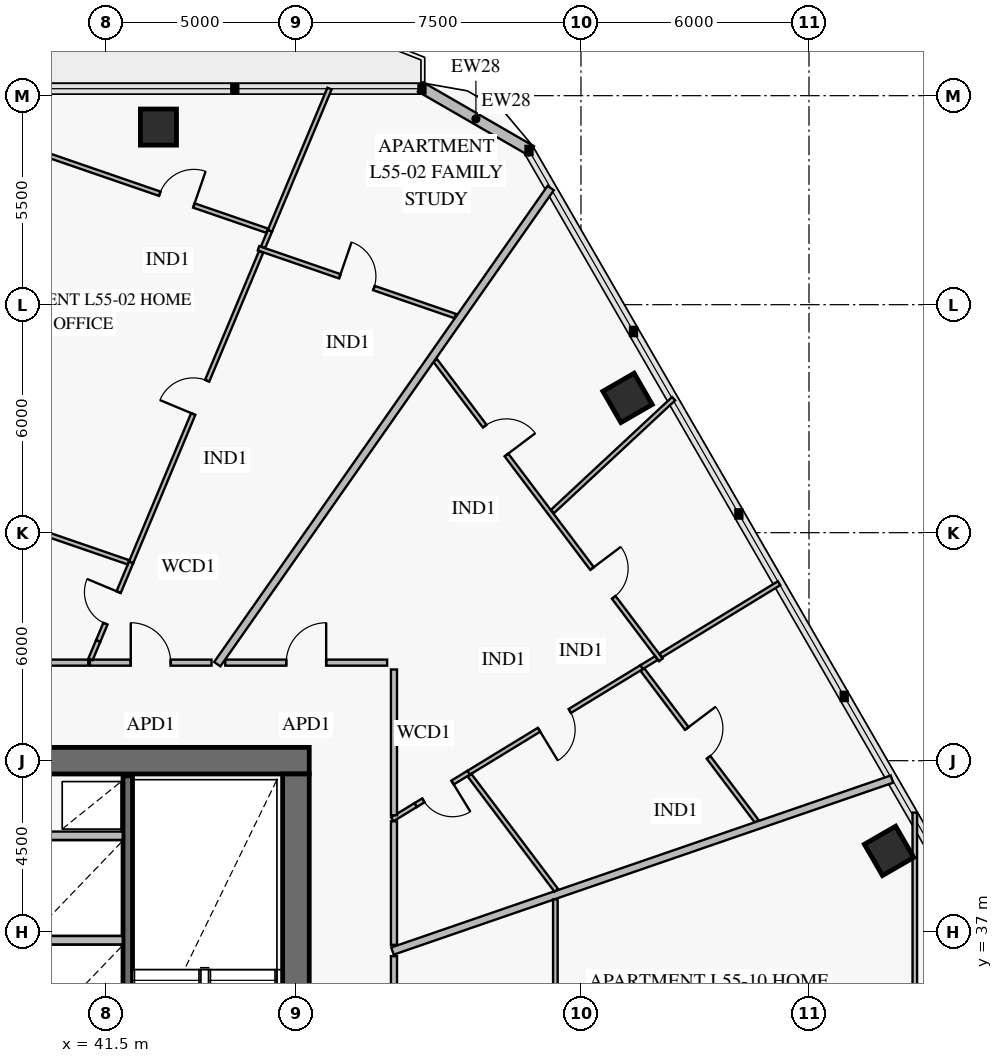
"""IFC4 building model, lengths in metres.
Left out: names, types, materials, properties, quantities, classifications, styles, units other than length and angle.
Written with IfcOpenShell. Run it as: python <this file> out.ifc"""

import sys

from ifc_helpers import new_model, si_unit, direction, frame, frame_2d, origin, origin_2d, place, context, subcontext, project, spatial, rectangle, extrude, element, fill, save


model = new_model("IFC4")
c1 = context("Model", 3, precision=1e-05, world=origin(), true_north=direction((0.0, 1.0)))
c2 = subcontext(c1, "Body", "Model", "MODEL_VIEW")
j1 = project(units=[si_unit("LENGTHUNIT", "METRE"), si_unit("PLANEANGLEUNIT", "RADIAN")], contexts=[c1])
p1 = place(None, origin())
s1 = spatial("IfcSite", under=j1, at=p1, CompositionType="ELEMENT")
p2 = place(p1, origin())
s2 = spatial("IfcBuilding", under=s1, at=p2, CompositionType="ELEMENT")
p3 = place(p2, frame((0.0, 0.0, 218.8)))
s3 = spatial("IfcBuildingStorey", under=s2, at=p3, CompositionType="ELEMENT", Elevation=218.8)
p4 = place(p3, frame((46.85, 41.5, 0.0), z_axis=(0.0, 0.0, 1.0), x_axis=(-1.0, 0.0, 0.0)))
e1 = element("IfcWall", 1, at=p4, inside=s3, PredefinedType="SHEAR", context=c2, shape_type="SweptSolid", body=[
    extrude(rectangle(XDim=7.9, YDim=0.7, at=frame_2d((3.95, 0.0))), origin(), (0.0, 0.0, 1.0), 3.8),
])
p5 = place(p3, frame((46.5, 22.85, 0.0), z_axis=(0.0, 0.0, 1.0), x_axis=(0.0, 1.0, 0.0)))
e2 = element("IfcWall", 2, at=p5, inside=s3, PredefinedType="SHEAR", context=c2, shape_type="SweptSolid", body=[
    extrude(rectangle(XDim=18.3, YDim=0.7, at=frame_2d((9.15, 0.0))), origin(), (0.0, 0.0, 1.0), 3.8),
])
p6 = place(p5, frame((8.9, 0.0, 0.0)))
e3 = element("IfcOpeningElement", 3, at=p6, cuts=e2, PredefinedType="OPENING", context=c2, shape_type="SweptSolid", body=[
    extrude(rectangle(XDim=1.1, YDim=2.15, at=frame_2d((0.55, 1.075))), frame((0.0, 0.362, 0.0), z_axis=(0.0, -1.0, 0.0), x_axis=(1.0, 0.0, 0.0)), (0.0, 0.0, 1.0), 0.724),
])
for number, where, z_axis, x_axis in (
    (4, (62.108, 39.126, 0.0), (0.0, 0.0, 1.0), (-0.5, 0.866, 0.0)),
    (5, (55.226, 51.047, 0.0), (0.0, 0.0, 1.0), (-0.5, 0.866, 0.0)),
    (6, (42.882, 58.173, 0.0), (0.0, 0.0, 1.0), (-1.0, 0.0, 0.0)),
):
    element("IfcColumn", number, at=place(p3, frame(where, z_axis=z_axis, x_axis=x_axis)), inside=s3, PredefinedType="COLUMN", context=c2, shape_type="SweptSolid", body=[
        extrude(rectangle(XDim=0.95, YDim=0.95, at=origin_2d()), origin(), (0.0, 0.0, 1.0), 3.55),
    ])
p7 = place(p3, frame((49.779, 59.231, 0.0), z_axis=(0.0, 0.0, 1.0), x_axis=(0.866020068361, -0.500009241111, 0.0)))
e7 = element("IfcWall", 7, at=p7, inside=s3, PredefinedType="SOLIDWALL", context=c2, shape_type="SweptSolid", body=[
    extrude(rectangle(XDim=3.365, YDim=0.28, at=frame_2d((1.683, 0.0))), origin(), (0.0, 0.0, 1.0), 3.55),
])
p8 = place(p3, frame((42.075, 31.4, 0.0), z_axis=(0.0, 0.0, 1.0), x_axis=(0.0, 1.0, 0.0)))
e8 = element("IfcWall", 8, at=p8, inside=s3, PredefinedType="SOLIDWALL", context=c2, shape_type="SweptSolid", body=[
    extrude(rectangle(XDim=9.7, YDim=0.25, at=frame_2d((4.85, 0.0))), origin(), (0.0, 0.0, 1.0), 3.8),
])
p9 = place(p3, frame((56.102, 44.153, 0.0), z_axis=(0.0, 0.0, 1.0), x_axis=(-0.601823931742, 0.798628796865, 0.0)))
e9 = element("IfcWall", 9, at=p9, inside=s3, PredefinedType="PARTITIONING", context=c2, shape_type="SweptSolid", body=[
    extrude(rectangle(XDim=9.865, YDim=0.12, at=frame_2d((4.932, 0.0))), origin(), (0.0, 0.0, 1.0), 2.9),
])
p10 = place(p9, frame((2.059, 0.0, 0.0)))
e10 = element("IfcOpeningElement", 10, at=p10, cuts=e9, PredefinedType="OPENING", context=c2, shape_type="SweptSolid", body=[
    extrude(rectangle(XDim=0.95, YDim=2.1, at=frame_2d((0.475, 1.05))), frame((0.0, 0.072, 0.0), z_axis=(0.0, -1.0, 0.0), x_axis=(1.0, 0.0, 0.0)), (0.0, 0.0, 1.0), 0.144),
])
p11 = place(p9, frame((6.751, 0.0, 0.0)))
e11 = element("IfcOpeningElement", 11, at=p11, cuts=e9, PredefinedType="OPENING", context=c2, shape_type="SweptSolid", body=[
    extrude(rectangle(XDim=0.95, YDim=2.1, at=frame_2d((0.475, 1.05))), frame((0.0, 0.072, 0.0), z_axis=(0.0, -1.0, 0.0), x_axis=(1.0, 0.0, 0.0)), (0.0, 0.0, 1.0), 0.144),
])
p12 = place(p3, frame((49.65, 40.332, 0.0), z_axis=(0.0, 0.0, 1.0), x_axis=(0.853576385117, 0.520967709911, 0.0)))
e12 = element("IfcWall", 12, at=p12, inside=s3, PredefinedType="PARTITIONING", context=c2, shape_type="SweptSolid", body=[
    extrude(rectangle(XDim=1.638, YDim=0.12, at=frame_2d((0.819, 0.0))), origin(), (0.0, 0.0, 1.0), 3.55),
])
p13 = place(p12, frame((0.238, 0.0, 0.0)))
e13 = element("IfcOpeningElement", 13, at=p13, cuts=e12, PredefinedType="OPENING", context=c2, shape_type="SweptSolid", body=[
    extrude(rectangle(XDim=0.9, YDim=2.1, at=frame_2d((0.45, 1.05))), frame((0.0, 0.072, 0.0), z_axis=(0.0, -1.0, 0.0), x_axis=(1.0, 0.0, 0.0)), (0.0, 0.0, 1.0), 0.144),
])
p14 = place(p3, frame((51.048, 41.186, 0.0), z_axis=(0.0, 0.0, 1.0), x_axis=(0.853552291935, 0.521007183187, 0.0)))
e14 = element("IfcWall", 14, at=p14, inside=s3, PredefinedType="PARTITIONING", context=c2, shape_type="SweptSolid", body=[
    extrude(rectangle(XDim=5.331, YDim=0.12, at=frame_2d((2.666, 0.0))), origin(), (0.0, 0.0, 1.0), 3.15),
])
p15 = place(p14, frame((2.165, 0.0, 0.0)))
e15 = element("IfcOpeningElement", 15, at=p15, cuts=e14, PredefinedType="OPENING", context=c2, shape_type="SweptSolid", body=[
    extrude(rectangle(XDim=0.95, YDim=2.1, at=frame_2d((0.475, 1.05))), frame((0.0, 0.072, 0.0), z_axis=(0.0, -1.0, 0.0), x_axis=(1.0, 0.0, 0.0)), (0.0, 0.0, 1.0), 0.144),
])
p16 = place(p3, frame((58.625, 39.906, 0.0), z_axis=(0.0, 0.0, 1.0), x_axis=(-0.60182042423, 0.798631440015, 0.0)))
e16 = element("IfcWall", 16, at=p16, inside=s3, PredefinedType="PARTITIONING", context=c2, shape_type="SweptSolid", body=[
    extrude(rectangle(XDim=4.995, YDim=0.12, at=frame_2d((2.498, 0.0))), origin(), (0.0, 0.0, 1.0), 3.55),
])
p17 = place(p16, frame((2.107, 0.0, 0.0)))
e17 = element("IfcOpeningElement", 17, at=p17, cuts=e16, PredefinedType="OPENING", context=c2, shape_type="SweptSolid", body=[
    extrude(rectangle(XDim=0.95, YDim=2.1, at=frame_2d((0.475, 1.05))), frame((0.0, 0.072, 0.0), z_axis=(0.0, -1.0, 0.0), x_axis=(1.0, 0.0, 0.0)), (0.0, 0.0, 1.0), 0.144),
])
p18 = place(p3, frame((48.9, 44.08, 0.0), z_axis=(0.0, 0.0, 1.0), x_axis=(-1.0, 0.0, 0.0)))
e18 = element("IfcWall", 18, at=p18, inside=s3, PredefinedType="PARTITIONING", context=c2, shape_type="SweptSolid", body=[
    extrude(rectangle(XDim=4.259, YDim=0.16, at=frame_2d((2.129, 0.0))), origin(), (0.0, 0.0, 1.0), 2.9),
])
p19 = place(p18, frame((1.604, 0.0, 0.0)))
e19 = element("IfcOpeningElement", 19, at=p19, cuts=e18, PredefinedType="OPENING", context=c2, shape_type="SweptSolid", body=[
    extrude(rectangle(XDim=1.05, YDim=2.15, at=frame_2d((0.525, 1.075))), frame((0.0, 0.092, 0.0), z_axis=(0.0, -1.0, 0.0), x_axis=(1.0, 0.0, 0.0)), (0.0, 0.0, 1.0), 0.184),
])
p20 = place(p3, frame((50.692, 53.201, 0.0), z_axis=(0.0, 0.0, 1.0), x_axis=(-0.945511260009, 0.325589399698, 0.0)))
e20 = element("IfcWall", 20, at=p20, inside=s3, PredefinedType="PARTITIONING", context=c2, shape_type="SweptSolid", body=[
    extrude(rectangle(XDim=5.475, YDim=0.12, at=frame_2d((2.738, 0.0))), origin(), (0.0, 0.0, 1.0), 3.55),
])
p21 = place(p20, frame((2.263, 0.0, 0.0)))
e21 = element("IfcOpeningElement", 21, at=p21, cuts=e20, PredefinedType="OPENING", context=c2, shape_type="SweptSolid", body=[
    extrude(rectangle(XDim=0.95, YDim=2.1, at=frame_2d((0.475, 1.05))), frame((0.0, 0.072, 0.0), z_axis=(0.0, -1.0, 0.0), x_axis=(1.0, 0.0, 0.0)), (0.0, 0.0, 1.0), 0.144),
])
p22 = place(p3, frame((41.297, 44.65, 0.0), z_axis=(0.0, 0.0, 1.0), x_axis=(0.386243492927, 0.922396858284, 0.0)))
e22 = element("IfcWall", 22, at=p22, inside=s3, PredefinedType="PARTITIONING", context=c2, shape_type="SweptSolid", body=[
    extrude(rectangle(XDim=2.246, YDim=0.12, at=frame_2d((1.123, 0.0))), origin(), (0.0, 0.0, 1.0), 3.55),
])
p23 = place(p22, frame((0.493, 0.0, 0.0)))
e23 = element("IfcOpeningElement", 23, at=p23, cuts=e22, PredefinedType="OPENING", context=c2, shape_type="SweptSolid", body=[
    extrude(rectangle(XDim=0.9, YDim=2.1, at=frame_2d((0.45, 1.05))), frame((0.0, 0.072, 0.0), z_axis=(0.0, -1.0, 0.0), x_axis=(1.0, 0.0, 0.0)), (0.0, 0.0, 1.0), 0.144),
])
p24 = place(p3, frame((42.164, 46.721, 0.0), z_axis=(0.0, 0.0, 1.0), x_axis=(0.386200840547, 0.922414717337, 0.0)))
e24 = element("IfcWall", 24, at=p24, inside=s3, PredefinedType="PARTITIONING", context=c2, shape_type="SweptSolid", body=[
    extrude(rectangle(XDim=8.854, YDim=0.12, at=frame_2d((4.427, 0.0))), origin(), (0.0, 0.0, 1.0), 3.55),
])
p25 = place(p24, frame((4.229, 0.0, 0.0)))
e25 = element("IfcOpeningElement", 25, at=p25, cuts=e24, PredefinedType="OPENING", context=c2, shape_type="SweptSolid", body=[
    extrude(rectangle(XDim=0.95, YDim=2.1, at=frame_2d((0.475, 1.05))), frame((0.0, 0.072, 0.0), z_axis=(0.0, -1.0, 0.0), x_axis=(1.0, 0.0, 0.0)), (0.0, 0.0, 1.0), 0.144),
])
p26 = place(p3, frame((45.636, 55.014, 0.0), z_axis=(0.0, 0.0, 1.0), x_axis=(0.38631298857, 0.922367754674, 0.0)))
e26 = element("IfcWall", 26, at=p26, inside=s3, PredefinedType="PARTITIONING", context=c2, shape_type="SweptSolid", body=[
    extrude(rectangle(XDim=0.469, YDim=0.12, at=frame_2d((0.235, 0.0))), origin(), (0.0, 0.0, 1.0), 3.55),
])
p27 = place(p3, frame((45.743, 55.446, 0.0), z_axis=(0.0, 0.0, 1.0), x_axis=(-0.945509015954, 0.325595916358, 0.0)))
e27 = element("IfcWall", 27, at=p27, inside=s3, PredefinedType="PARTITIONING", context=c2, shape_type="SweptSolid", body=[
    extrude(rectangle(XDim=8.711, YDim=0.12, at=frame_2d((4.355, 0.0))), origin(), (0.0, 0.0, 1.0), 2.87),
])
p28 = place(p27, frame((2.04, 0.0, 0.0)))
e28 = element("IfcOpeningElement", 28, at=p28, cuts=e27, PredefinedType="OPENING", context=c2, shape_type="SweptSolid", body=[
    extrude(rectangle(XDim=0.95, YDim=2.1, at=frame_2d((0.475, 1.05))), frame((0.0, 0.072, 0.0), z_axis=(0.0, -1.0, 0.0), x_axis=(1.0, 0.0, 0.0)), (0.0, 0.0, 1.0), 0.144),
])
p29 = place(p3, frame((44.278, 44.08, 0.0), z_axis=(0.0, 0.0, 1.0), x_axis=(-1.0, 0.0, 0.0)))
e29 = element("IfcWall", 29, at=p29, inside=s3, PredefinedType="PARTITIONING", context=c2, shape_type="SweptSolid", body=[
    extrude(rectangle(XDim=3.198, YDim=0.16, at=frame_2d((1.599, 0.0))), origin(), (0.0, 0.0, 1.0), 3.55),
])
p30 = place(p29, frame((1.074, 0.0, 0.0)))
e30 = element("IfcOpeningElement", 30, at=p30, cuts=e29, PredefinedType="OPENING", context=c2, shape_type="SweptSolid", body=[
    extrude(rectangle(XDim=1.05, YDim=2.15, at=frame_2d((0.525, 1.075))), frame((0.0, 0.092, 0.0), z_axis=(0.0, -1.0, 0.0), x_axis=(1.0, 0.0, 0.0)), (0.0, 0.0, 1.0), 0.184),
])
p31 = place(p3, frame((62.784, 29.988, 0.0), z_axis=(0.0, 0.0, 1.0), x_axis=(0.0, 1.0, 0.0)))
e31 = element("IfcWall", 31, at=p31, inside=s3, PredefinedType="PARTITIONING", context=c2, shape_type="SweptSolid", body=[
    extrude(rectangle(XDim=10.146, YDim=0.12, at=frame_2d((5.073, 0.0))), origin(), (0.0, 0.0, 1.0), 3.122),
])
p32 = place(p31, frame((4.514, 0.0, 0.0)))
e32 = element("IfcOpeningElement", 32, at=p32, cuts=e31, PredefinedType="OPENING", context=c2, shape_type="SweptSolid", body=[
    extrude(rectangle(XDim=0.95, YDim=2.1, at=frame_2d((0.475, 1.05))), frame((0.0, 0.072, 0.0), z_axis=(0.0, -1.0, 0.0), x_axis=(1.0, 0.0, 0.0)), (0.0, 0.0, 1.0), 0.144),
])
for number, where, z_axis, x_axis in (
    (33, (39.558, 36.775, 0.0), (0.0, 0.0, 1.0), (1.0, 0.0, 0.0)),
    (34, (39.558, 39.525, 0.0), (0.0, 0.0, 1.0), (1.0, 0.0, 0.0)),
):
    element("IfcWall", number, at=place(p3, frame(where, z_axis=z_axis, x_axis=x_axis)), inside=s3, PredefinedType="PARTITIONING", context=c2, shape_type="SweptSolid", body=[
        extrude(rectangle(XDim=2.384, YDim=0.22, at=frame_2d((1.192, 0.0))), origin(), (0.0, 0.0, 1.0), 3.55),
    ])
p33 = place(p3, frame((49.04, 36.49, 0.0), z_axis=(0.0, 0.0, 1.0), x_axis=(0.94551604925, 0.325575491417, 0.0)))
e35 = element("IfcWall", 35, at=p33, inside=s3, PredefinedType="PARTITIONING", context=c2, shape_type="SweptSolid", body=[
    extrude(rectangle(XDim=13.9, YDim=0.2, at=frame_2d((6.95, 0.0))), origin(), (0.0, 0.0, 1.0), 2.87),
])
p34 = place(p3, frame((53.247, 48.055, 0.0), z_axis=(0.0, 0.0, 1.0), x_axis=(0.731935379079, 0.681374053551, 0.0)))
e36 = element("IfcWall", 36, at=p34, inside=s3, PredefinedType="PARTITIONING", context=c2, shape_type="SweptSolid", body=[
    extrude(rectangle(XDim=4.36, YDim=0.12, at=frame_2d((2.18, 0.0))), origin(), (0.0, 0.0, 1.0), 2.87),
])
p35 = place(p3, frame((49.035, 39.957, 0.0), z_axis=(0.0, 0.0, 1.0), x_axis=(0.853491148884, 0.521107339017, 0.0)))
e37 = element("IfcWall", 37, at=p35, inside=s3, PredefinedType="PARTITIONING", context=c2, shape_type="SweptSolid", body=[
    extrude(rectangle(XDim=0.72, YDim=0.12, at=frame_2d((0.36, 0.0))), origin(), (0.0, 0.0, 1.0), 3.55),
])
p36 = place(p3, frame((55.598, 43.963, 0.0), z_axis=(0.0, 0.0, 1.0), x_axis=(0.8534556965, 0.521165399956, 0.0)))
e38 = element("IfcWall", 38, at=p36, inside=s3, PredefinedType="PARTITIONING", context=c2, shape_type="SweptSolid", body=[
    extrude(rectangle(XDim=0.451, YDim=0.12, at=frame_2d((0.226, 0.0))), origin(), (0.0, 0.0, 1.0), 3.55),
])
p37 = place(p3, frame((56.1, 44.269, 0.0), z_axis=(0.0, 0.0, 1.0), x_axis=(0.853564621018, 0.520986984239, 0.0)))
e39 = element("IfcWall", 39, at=p37, inside=s3, PredefinedType="PARTITIONING", context=c2, shape_type="SweptSolid", body=[
    extrude(rectangle(XDim=3.648, YDim=0.12, at=frame_2d((1.824, 0.0))), origin(), (0.0, 0.0, 1.0), 2.87),
])
p38 = place(p3, frame((53.351, 38.089, 0.0), z_axis=(0.0, 0.0, 1.0), x_axis=(-0.601810973107, 0.798638561959, 0.0)))
e40 = element("IfcWall", 40, at=p38, inside=s3, PredefinedType="PARTITIONING", context=c2, shape_type="SweptSolid", body=[
    extrude(rectangle(XDim=3.793, YDim=0.12, at=frame_2d((1.896, 0.0))), origin(), (0.0, 0.0, 1.0), 3.55),
])
p39 = place(p3, frame((44.43, 44.04, 0.0), z_axis=(0.0, 0.0, 1.0), x_axis=(0.573576964884, 0.819151674206, 0.0)))
e41 = element("IfcWall", 41, at=p39, inside=s3, PredefinedType="PARTITIONING", context=c2, shape_type="SweptSolid", body=[
    extrude(rectangle(XDim=15.295, YDim=0.2, at=frame_2d((7.647, 0.0))), origin(), (0.0, 0.0, 1.0), 2.87),
])
p40 = place(p3, frame((41.095, 44.168, 0.0), z_axis=(0.0, 0.0, 1.0), x_axis=(0.38640620175, 0.922328708893, 0.0)))
e42 = element("IfcWall", 42, at=p40, inside=s3, PredefinedType="PARTITIONING", context=c2, shape_type="SweptSolid", body=[
    extrude(rectangle(XDim=0.522, YDim=0.12, at=frame_2d((0.261, 0.0))), origin(), (0.0, 0.0, 1.0), 3.55),
])
p41 = place(p3, frame((45.818, 55.447, 0.0), z_axis=(0.0, 0.0, 1.0), x_axis=(0.386222700776, 0.922405564492, 0.0)))
e43 = element("IfcWall", 43, at=p41, inside=s3, PredefinedType="PARTITIONING", context=c2, shape_type="SweptSolid", body=[
    extrude(rectangle(XDim=4.054, YDim=0.12, at=frame_2d((2.027, 0.0))), origin(), (0.0, 0.0, 1.0), 2.87),
])
p42 = place(p3, frame((42.09, 46.721, 0.0), z_axis=(0.0, 0.0, 1.0), x_axis=(-0.945518250286, 0.325569099234, 0.0)))
e44 = element("IfcWall", 44, at=p42, inside=s3, PredefinedType="PARTITIONING", context=c2, shape_type="SweptSolid", body=[
    extrude(rectangle(XDim=5.479, YDim=0.12, at=frame_2d((2.74, 0.0))), origin(), (0.0, 0.0, 1.0), 2.9),
])
p43 = place(p3, frame((53.327, 30.723, 0.0), z_axis=(0.0, 0.0, 1.0), x_axis=(0.0, 1.0, 0.0)))
e45 = element("IfcWall", 45, at=p43, inside=s3, PredefinedType="PARTITIONING", context=c2, shape_type="SweptSolid", body=[
    extrude(rectangle(XDim=7.129, YDim=0.12, at=frame_2d((3.564, 0.0))), origin(), (0.0, 0.0, 1.0), 2.9),
])
p44 = place(p3, frame((49.08, 40.064, 0.0), z_axis=(0.0, 0.0, 1.0), x_axis=(0.0, 1.0, 0.0)))
e46 = element("IfcWall", 46, at=p44, inside=s3, PredefinedType="PARTITIONING", context=c2, shape_type="SweptSolid", body=[
    extrude(rectangle(XDim=3.836, YDim=0.16, at=frame_2d((1.918, 0.0))), origin(), (0.0, 0.0, 1.0), 3.55),
])
p45 = place(p3, frame((49.08, 36.653, 0.0), z_axis=(0.0, 0.0, 1.0), x_axis=(0.0, 1.0, 0.0)))
e47 = element("IfcWall", 47, at=p45, inside=s3, PredefinedType="PARTITIONING", context=c2, shape_type="SweptSolid", body=[
    extrude(rectangle(XDim=3.251, YDim=0.16, at=frame_2d((1.625, 0.0))), origin(), (0.0, 0.0, 1.0), 3.55),
])
p46 = place(p3, frame((41.036, 44.08, 0.0), z_axis=(0.0, 0.0, 1.0), x_axis=(-1.0, 0.0, 0.0)))
e48 = element("IfcWall", 48, at=p46, inside=s3, PredefinedType="PARTITIONING", context=c2, shape_type="SweptSolid", body=[
    extrude(rectangle(XDim=4.278, YDim=0.16, at=frame_2d((2.139, 0.0))), origin(), (0.0, 0.0, 1.0), 2.9),
])
p47 = place(p3, frame((49.08, 31.052, 0.0), z_axis=(0.0, 0.0, 1.0), x_axis=(0.0, 1.0, 0.0)))
e49 = element("IfcWall", 49, at=p47, inside=s3, PredefinedType="PARTITIONING", context=c2, shape_type="SweptSolid", body=[
    extrude(rectangle(XDim=5.303, YDim=0.16, at=frame_2d((2.651, 0.0))), origin(), (0.0, 0.0, 1.0), 2.9),
])
p48 = place(p10, frame((0.95, 0.0, 0.0), z_axis=(0.0, 0.0, 1.0), x_axis=(-1.0, 0.0, 0.0)))
e50 = element("IfcDoor", 50, at=p48, inside=s3, OperationType="SINGLE_SWING_LEFT", PredefinedType="DOOR", context=c2, shape_type="SweptSolid", body=[
    extrude(rectangle(XDim=0.95, YDim=2.1, at=frame_2d((0.475, 1.05))), frame((0.0, 0.025, 0.0), z_axis=(0.0, -1.0, 0.0), x_axis=(1.0, 0.0, 0.0)), (0.0, 0.0, 1.0), 0.05),
])
fill(e10, e50)
p49 = place(p11, frame((0.95, 0.0, 0.0), z_axis=(0.0, 0.0, 1.0), x_axis=(-1.0, 0.0, 0.0)))
e51 = element("IfcDoor", 51, at=p49, inside=s3, OperationType="SINGLE_SWING_RIGHT", PredefinedType="DOOR", context=c2, shape_type="SweptSolid", body=[
    extrude(rectangle(XDim=0.95, YDim=2.1, at=frame_2d((0.475, 1.05))), frame((0.0, 0.025, 0.0), z_axis=(0.0, -1.0, 0.0), x_axis=(1.0, 0.0, 0.0)), (0.0, 0.0, 1.0), 0.05),
])
fill(e11, e51)
p50 = place(p13, frame((0.9, 0.0, 0.0), z_axis=(0.0, 0.0, 1.0), x_axis=(-1.0, 0.0, 0.0)))
e52 = element("IfcDoor", 52, at=p50, inside=s3, OperationType="SINGLE_SWING_LEFT", PredefinedType="DOOR", context=c2, shape_type="SweptSolid", body=[
    extrude(rectangle(XDim=0.9, YDim=2.1, at=frame_2d((0.45, 1.05))), frame((0.0, 0.025, 0.0), z_axis=(0.0, -1.0, 0.0), x_axis=(1.0, 0.0, 0.0)), (0.0, 0.0, 1.0), 0.05),
])
fill(e13, e52)
p51 = place(p15, frame((0.95, 0.0, 0.0), z_axis=(0.0, 0.0, 1.0), x_axis=(-1.0, 0.0, 0.0)))
e53 = element("IfcDoor", 53, at=p51, inside=s3, OperationType="SINGLE_SWING_RIGHT", PredefinedType="DOOR", context=c2, shape_type="SweptSolid", body=[
    extrude(rectangle(XDim=0.95, YDim=2.1, at=frame_2d((0.475, 1.05))), frame((0.0, 0.025, 0.0), z_axis=(0.0, -1.0, 0.0), x_axis=(1.0, 0.0, 0.0)), (0.0, 0.0, 1.0), 0.05),
])
fill(e15, e53)
p52 = place(p17, frame((0.95, 0.0, 0.0), z_axis=(0.0, 0.0, 1.0), x_axis=(-1.0, 0.0, 0.0)))
e54 = element("IfcDoor", 54, at=p52, inside=s3, OperationType="SINGLE_SWING_LEFT", PredefinedType="DOOR", context=c2, shape_type="SweptSolid", body=[
    extrude(rectangle(XDim=0.95, YDim=2.1, at=frame_2d((0.475, 1.05))), frame((0.0, 0.025, 0.0), z_axis=(0.0, -1.0, 0.0), x_axis=(1.0, 0.0, 0.0)), (0.0, 0.0, 1.0), 0.05),
])
fill(e17, e54)
p53 = place(p19, frame((1.05, 0.0, 0.0), z_axis=(0.0, 0.0, 1.0), x_axis=(-1.0, 0.0, 0.0)))
e55 = element("IfcDoor", 55, at=p53, inside=s3, OperationType="SINGLE_SWING_RIGHT", PredefinedType="DOOR", context=c2, shape_type="SweptSolid", body=[
    extrude(rectangle(XDim=1.05, YDim=2.15, at=frame_2d((0.525, 1.075))), frame((0.0, 0.025, 0.0), z_axis=(0.0, -1.0, 0.0), x_axis=(1.0, 0.0, 0.0)), (0.0, 0.0, 1.0), 0.05),
])
fill(e19, e55)
p54 = place(p21, frame((0.95, 0.0, 0.0), z_axis=(0.0, 0.0, 1.0), x_axis=(-1.0, 0.0, 0.0)))
e56 = element("IfcDoor", 56, at=p54, inside=s3, OperationType="SINGLE_SWING_LEFT", PredefinedType="DOOR", context=c2, shape_type="SweptSolid", body=[
    extrude(rectangle(XDim=0.95, YDim=2.1, at=frame_2d((0.475, 1.05))), frame((0.0, 0.025, 0.0), z_axis=(0.0, -1.0, 0.0), x_axis=(1.0, 0.0, 0.0)), (0.0, 0.0, 1.0), 0.05),
])
fill(e21, e56)
p55 = place(p23, origin())
e57 = element("IfcDoor", 57, at=p55, inside=s3, OperationType="SINGLE_SWING_RIGHT", PredefinedType="DOOR", context=c2, shape_type="SweptSolid", body=[
    extrude(rectangle(XDim=0.9, YDim=2.1, at=frame_2d((0.45, 1.05))), frame((0.0, 0.025, 0.0), z_axis=(0.0, -1.0, 0.0), x_axis=(1.0, 0.0, 0.0)), (0.0, 0.0, 1.0), 0.05),
])
fill(e23, e57)
p56 = place(p25, origin())
e58 = element("IfcDoor", 58, at=p56, inside=s3, OperationType="SINGLE_SWING_LEFT", PredefinedType="DOOR", context=c2, shape_type="SweptSolid", body=[
    extrude(rectangle(XDim=0.95, YDim=2.1, at=frame_2d((0.475, 1.05))), frame((0.0, 0.025, 0.0), z_axis=(0.0, -1.0, 0.0), x_axis=(1.0, 0.0, 0.0)), (0.0, 0.0, 1.0), 0.05),
])
fill(e25, e58)
p57 = place(p28, frame((0.95, 0.0, 0.0), z_axis=(0.0, 0.0, 1.0), x_axis=(-1.0, 0.0, 0.0)))
e59 = element("IfcDoor", 59, at=p57, inside=s3, OperationType="SINGLE_SWING_RIGHT", PredefinedType="DOOR", context=c2, shape_type="SweptSolid", body=[
    extrude(rectangle(XDim=0.95, YDim=2.1, at=frame_2d((0.475, 1.05))), frame((0.0, 0.025, 0.0), z_axis=(0.0, -1.0, 0.0), x_axis=(1.0, 0.0, 0.0)), (0.0, 0.0, 1.0), 0.05),
])
fill(e28, e59)
p58 = place(p30, frame((1.05, 0.0, 0.0), z_axis=(0.0, 0.0, 1.0), x_axis=(-1.0, 0.0, 0.0)))
e60 = element("IfcDoor", 60, at=p58, inside=s3, OperationType="SINGLE_SWING_LEFT", PredefinedType="DOOR", context=c2, shape_type="SweptSolid", body=[
    extrude(rectangle(XDim=1.05, YDim=2.15, at=frame_2d((0.525, 1.075))), frame((0.0, 0.025, 0.0), z_axis=(0.0, -1.0, 0.0), x_axis=(1.0, 0.0, 0.0)), (0.0, 0.0, 1.0), 0.05),
])
fill(e30, e60)
save(model, sys.argv[1])
